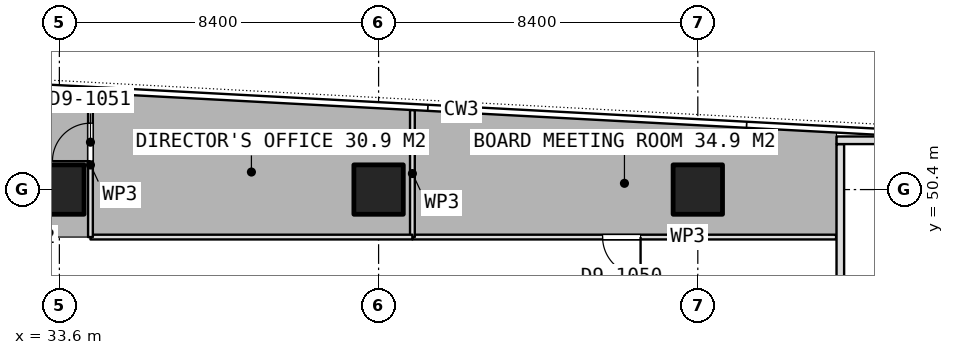
"""IFC4 building model, lengths in metres.
Left out: names, types, materials, properties, quantities, classifications, styles, units other than length and angle.
Written with IfcOpenShell. Run it as: python <this file> out.ifc"""

import sys

from ifc_helpers import new_model, si_unit, direction, frame, frame_2d, origin, origin_2d, place, context, subcontext, project, spatial, rectangle, extrude, element, fill, save


model = new_model("IFC4")
c1 = context("Model", 3, precision=1e-05, world=origin(), true_north=direction((0.0, 1.0)))
c2 = subcontext(c1, "Body", "Model", "MODEL_VIEW")
j1 = project(units=[si_unit("LENGTHUNIT", "METRE"), si_unit("PLANEANGLEUNIT", "RADIAN")], contexts=[c1])
p1 = place(None, origin())
s1 = spatial("IfcSite", under=j1, at=p1, CompositionType="ELEMENT")
p2 = place(p1, origin())
s2 = spatial("IfcBuilding", under=s1, at=p2, CompositionType="ELEMENT")
p3 = place(p2, frame((0.0, 0.0, 283.85)))
s3 = spatial("IfcBuildingStorey", under=s2, at=p3, CompositionType="ELEMENT", Elevation=283.85)
for number, where, z_axis, x_axis in (
    (1, (33.6, 50.4, 0.0), (0.0, 0.0, 1.0), (1.0, 0.0, 0.0)),
    (2, (42.0, 50.4, 0.0), (0.0, 0.0, 1.0), (1.0, 0.0, 0.0)),
    (3, (50.4, 50.4, 0.0), (0.0, 0.0, 1.0), (1.0, 0.0, 0.0)),
):
    element("IfcColumn", number, at=place(p3, frame(where, z_axis=z_axis, x_axis=x_axis)), inside=s3, PredefinedType="COLUMN", context=c2, shape_type="SweptSolid", body=[
        extrude(rectangle(XDim=1.3, YDim=1.3, at=origin_2d()), origin(), (0.0, 0.0, 1.0), 3.75),
    ])
p4 = place(p3, frame((54.039, 49.15, 0.0), z_axis=(0.0, 0.0, 1.0), x_axis=(-1.0, 0.0, 0.0)))
e4 = element("IfcWall", 4, at=p4, inside=s3, PredefinedType="PARTITIONING", context=c2, shape_type="SweptSolid", body=[
    extrude(rectangle(XDim=11.149, YDim=0.125, at=frame_2d((5.575, 0.0))), origin(), (0.0, 0.0, 1.0), 3.5),
])
p5 = place(p4, frame((5.145, 0.0, 0.0)))
e5 = element("IfcOpeningElement", 5, at=p5, cuts=e4, PredefinedType="OPENING", context=c2, shape_type="SweptSolid", body=[
    extrude(rectangle(XDim=1.0, YDim=2.1, at=frame_2d((0.5, 1.05))), frame((0.0, 0.073, 0.0), z_axis=(0.0, -1.0, 0.0), x_axis=(1.0, 0.0, 0.0)), (0.0, 0.0, 1.0), 0.145),
])
p6 = place(p3, frame((42.89, 49.15, 0.0), z_axis=(0.0, 0.0, 1.0), x_axis=(0.0, 1.0, 0.0)))
e6 = element("IfcWall", 6, at=p6, inside=s3, PredefinedType="PARTITIONING", context=c2, shape_type="SweptSolid", body=[
    extrude(rectangle(XDim=3.343, YDim=0.125, at=frame_2d((1.671, 0.0))), origin(), (0.0, 0.0, 1.0), 3.5),
])
p7 = place(p3, frame((42.889, 49.15, 0.0), z_axis=(0.0, 0.0, 1.0), x_axis=(-1.0, 0.0, 0.0)))
e7 = element("IfcWall", 7, at=p7, inside=s3, PredefinedType="PARTITIONING", context=c2, shape_type="SweptSolid", body=[
    extrude(rectangle(XDim=8.471, YDim=0.125, at=frame_2d((4.235, 0.0))), origin(), (0.0, 0.0, 1.0), 3.5),
])
p8 = place(p3, frame((34.418, 49.15, 0.0), z_axis=(0.0, 0.0, 1.0), x_axis=(0.0, 1.0, 0.0)))
e8 = element("IfcWall", 8, at=p8, inside=s3, PredefinedType="PARTITIONING", context=c2, shape_type="SweptSolid", body=[
    extrude(rectangle(XDim=3.793, YDim=0.125, at=frame_2d((1.896, 0.0))), origin(), (0.0, 0.0, 1.0), 3.5),
])
p9 = place(p8, frame((1.997, 0.0, 0.0)))
e9 = element("IfcOpeningElement", 9, at=p9, cuts=e8, PredefinedType="OPENING", context=c2, shape_type="SweptSolid", body=[
    extrude(rectangle(XDim=1.0, YDim=2.1, at=frame_2d((0.5, 1.05))), frame((0.0, 0.073, 0.0), z_axis=(0.0, -1.0, 0.0), x_axis=(1.0, 0.0, 0.0)), (0.0, 0.0, 1.0), 0.145),
])
p10 = place(p3, frame((54.15, 15.602, 0.0), z_axis=(0.0, 0.0, 1.0), x_axis=(0.0, 1.0, 0.0)))
e10 = element("IfcWall", 10, at=p10, inside=s3, PredefinedType="PARTITIONING", context=c2, shape_type="SweptSolid", body=[
    extrude(rectangle(XDim=35.995, YDim=0.2, at=frame_2d((17.998, 0.0))), origin(), (0.0, 0.0, 1.0), 3.5),
])
p11 = place(p10, frame((21.598, 0.0, 0.0)))
e11 = element("IfcOpeningElement", 11, at=p11, cuts=e10, PredefinedType="OPENING", context=c2, shape_type="SweptSolid", body=[
    extrude(rectangle(XDim=1.2, YDim=2.1, at=frame_2d((0.6, 1.05))), frame((0.0, 0.11, 0.0), z_axis=(0.0, -1.0, 0.0), x_axis=(1.0, 0.0, 0.0)), (0.0, 0.0, 1.0), 0.22),
])
p12 = place(p3, frame((54.05, 51.697, 0.0), z_axis=(0.0, 0.0, 1.0), x_axis=(1.0, 0.0, 0.0)))
e12 = element("IfcWall", 12, at=p12, inside=s3, PredefinedType="PARTITIONING", context=c2, shape_type="SweptSolid", body=[
    extrude(rectangle(XDim=6.12, YDim=0.2, at=frame_2d((3.06, 0.0))), origin(), (0.0, 0.0, 1.0), 3.5),
])
p13 = place(p5, origin())
e13 = element("IfcDoor", 13, at=p13, inside=s3, OperationType="SINGLE_SWING_LEFT", PredefinedType="DOOR", context=c2, shape_type="SweptSolid", body=[
    extrude(rectangle(XDim=1.0, YDim=2.1, at=frame_2d((0.5, 1.05))), frame((0.0, 0.025, 0.0), z_axis=(0.0, -1.0, 0.0), x_axis=(1.0, 0.0, 0.0)), (0.0, 0.0, 1.0), 0.05),
])
fill(e5, e13)
p14 = place(p9, origin())
e14 = element("IfcDoor", 14, at=p14, inside=s3, OperationType="SINGLE_SWING_LEFT", PredefinedType="DOOR", context=c2, shape_type="SweptSolid", body=[
    extrude(rectangle(XDim=1.0, YDim=2.1, at=frame_2d((0.5, 1.05))), frame((0.0, 0.025, 0.0), z_axis=(0.0, -1.0, 0.0), x_axis=(1.0, 0.0, 0.0)), (0.0, 0.0, 1.0), 0.05),
])
fill(e9, e14)
save(model, sys.argv[1])
